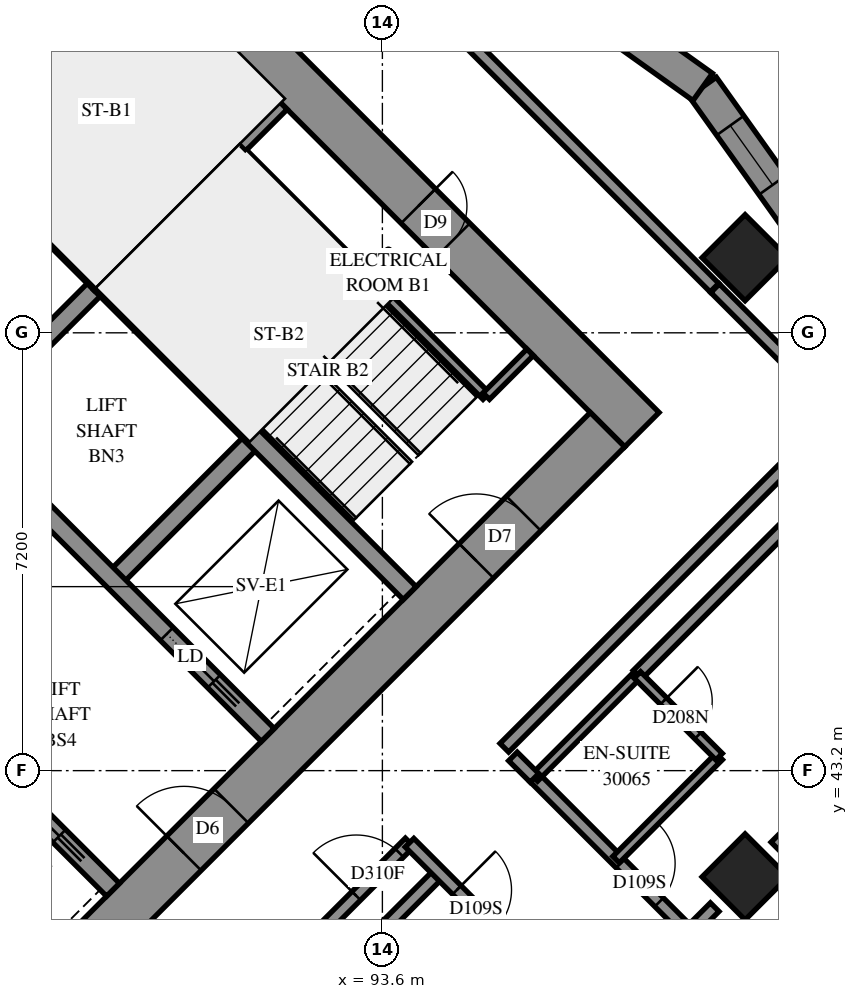
"""IFC4 building model, lengths in metres.
Left out: names, types, materials, properties, quantities, classifications, styles, units other than length and angle.
Written with IfcOpenShell. Run it as: python <this file> out.ifc"""

import sys

from ifc_helpers import new_model, si_unit, direction, frame, frame_2d, origin, origin_2d, place, context, subcontext, project, spatial, polyline, rectangle, outline, extrude, element, fill, save


model = new_model("IFC4")
c1 = context("Model", 3, precision=1e-05, world=origin(), true_north=direction((0.0, 1.0)))
c2 = subcontext(c1, "Body", "Model", "MODEL_VIEW")
j1 = project(units=[si_unit("LENGTHUNIT", "METRE"), si_unit("PLANEANGLEUNIT", "RADIAN")], contexts=[c1])
p1 = place(None, origin())
s1 = spatial("IfcSite", under=j1, at=p1, CompositionType="ELEMENT")
p2 = place(p1, origin())
s2 = spatial("IfcBuilding", under=s1, at=p2, CompositionType="ELEMENT")
p3 = place(p2, frame((0.0, 0.0, 111.8)))
s3 = spatial("IfcBuildingStorey", under=s2, at=p3, CompositionType="ELEMENT", Elevation=111.8)
for number, where, z_axis, x_axis in (
    (1, (99.565, 51.635, 0.0), (0.0, 0.0, 1.0), (0.707, -0.707, 0.0)),
    (2, (99.565, 41.453, 0.0), (0.0, 0.0, 1.0), (0.707, -0.707, 0.0)),
):
    element("IfcColumn", number, at=place(p3, frame(where, z_axis=z_axis, x_axis=x_axis)), inside=s3, PredefinedType="COLUMN", context=c2, shape_type="SweptSolid", body=[
        extrude(rectangle(XDim=1.0, YDim=1.0, at=origin_2d()), origin(), (0.0, 0.0, 1.0), 3.1),
    ])
p4 = place(p3, frame((86.554, 60.121, -0.3), z_axis=(0.0, 0.0, 1.0), x_axis=(0.7071067812, -0.7071067812, 0.0)))
e3 = element("IfcWall", 3, at=p4, inside=s3, PredefinedType="SHEAR", context=c2, shape_type="SweptSolid", body=[
    extrude(rectangle(XDim=16.0, YDim=0.8, at=frame_2d((8.0, 0.0))), origin(), (0.0, 0.0, 1.0), 2.7),
])
p5 = place(p4, frame((10.8, 0.0, 0.3)))
e4 = element("IfcOpeningElement", 4, at=p5, cuts=e3, PredefinedType="OPENING", context=c2, shape_type="SweptSolid", body=[
    extrude(rectangle(XDim=0.8, YDim=2.1, at=frame_2d((0.4, 1.05))), frame((0.0, 0.41, 0.0), z_axis=(0.0, -1.0, 0.0), x_axis=(1.0, 0.0, 0.0)), (0.0, 0.0, 1.0), 0.82),
])
p6 = place(p3, frame((87.12, 38.625, -0.3), z_axis=(0.0, 0.0, 1.0), x_axis=(0.7071067812, 0.7071067812, 0.0)))
e5 = element("IfcWall", 5, at=p6, inside=s3, PredefinedType="SHEAR", context=c2, shape_type="SweptSolid", body=[
    extrude(rectangle(XDim=14.4, YDim=0.8, at=frame_2d((7.2, 0.0))), origin(), (0.0, 0.0, 1.0), 2.7),
])
p7 = place(p6, frame((4.55, 0.0, 0.3)))
e6 = element("IfcOpeningElement", 6, at=p7, cuts=e5, PredefinedType="OPENING", context=c2, shape_type="SweptSolid", body=[
    extrude(rectangle(XDim=1.1, YDim=2.1, at=frame_2d((0.55, 1.05))), frame((0.0, 0.41, 0.0), z_axis=(0.0, -1.0, 0.0), x_axis=(1.0, 0.0, 0.0)), (0.0, 0.0, 1.0), 0.82),
])
p8 = place(p6, frame((11.35, 0.0, 0.3)))
e7 = element("IfcOpeningElement", 7, at=p8, cuts=e5, PredefinedType="OPENING", context=c2, shape_type="SweptSolid", body=[
    extrude(rectangle(XDim=1.1, YDim=2.1, at=frame_2d((0.55, 1.05))), frame((0.0, 0.41, 0.0), z_axis=(0.0, -1.0, 0.0), x_axis=(1.0, 0.0, 0.0)), (0.0, 0.0, 1.0), 0.82),
])
for number, where, z_axis, x_axis in (
    (8, (86.625, 48.878, 0.0), (0.0, 0.0, 1.0), (0.707, 0.707, 0.0)),
    (9, (89.17, 46.332, 0.0), (0.0, 0.0, 1.0), (0.707, 0.707, 0.0)),
):
    element("IfcWall", number, at=place(p3, frame(where, z_axis=z_axis, x_axis=x_axis)), inside=s3, PredefinedType="SOLIDWALL", context=c2, shape_type="SweptSolid", body=[
        extrude(rectangle(XDim=3.3, YDim=0.3, at=frame_2d((1.65, 0.0))), origin(), (0.0, 0.0, 1.0), 3.1),
    ])
p9 = place(p3, frame((78.988, 51.423, 0.0), z_axis=(0.0, 0.0, 1.0), x_axis=(0.7071067812, -0.7071067812, 0.0)))
e10 = element("IfcWall", 10, at=p9, inside=s3, PredefinedType="SOLIDWALL", context=c2, shape_type="SweptSolid", body=[
    extrude(rectangle(XDim=14.4, YDim=0.3, at=frame_2d((7.2, 0.0))), origin(), (0.0, 0.0, 1.0), 3.1),
])
p10 = place(p9, frame((1.25, 0.0, 0.0)))
e11 = element("IfcOpeningElement", 11, at=p10, cuts=e10, PredefinedType="OPENING", context=c2, shape_type="SweptSolid", body=[
    extrude(rectangle(XDim=1.1, YDim=2.1, at=frame_2d((0.55, 1.05))), frame((0.0, 0.16, 0.0), z_axis=(0.0, -1.0, 0.0), x_axis=(1.0, 0.0, 0.0)), (0.0, 0.0, 1.0), 0.32),
])
p11 = place(p9, frame((4.85, 0.0, 0.0)))
e12 = element("IfcOpeningElement", 12, at=p11, cuts=e10, PredefinedType="OPENING", context=c2, shape_type="SweptSolid", body=[
    extrude(rectangle(XDim=1.1, YDim=2.1, at=frame_2d((0.55, 1.05))), frame((0.0, 0.16, 0.0), z_axis=(0.0, -1.0, 0.0), x_axis=(1.0, 0.0, 0.0)), (0.0, 0.0, 1.0), 0.32),
])
p12 = place(p9, frame((8.45, 0.0, 0.0)))
e13 = element("IfcOpeningElement", 13, at=p12, cuts=e10, PredefinedType="OPENING", context=c2, shape_type="SweptSolid", body=[
    extrude(rectangle(XDim=1.1, YDim=2.1, at=frame_2d((0.55, 1.05))), frame((0.0, 0.16, 0.0), z_axis=(0.0, -1.0, 0.0), x_axis=(1.0, 0.0, 0.0)), (0.0, 0.0, 1.0), 0.32),
])
p13 = place(p9, frame((12.05, 0.0, 0.0)))
e14 = element("IfcOpeningElement", 14, at=p13, cuts=e10, PredefinedType="OPENING", context=c2, shape_type="SweptSolid", body=[
    extrude(rectangle(XDim=1.1, YDim=2.1, at=frame_2d((0.55, 1.05))), frame((0.0, 0.16, 0.0), z_axis=(0.0, -1.0, 0.0), x_axis=(1.0, 0.0, 0.0)), (0.0, 0.0, 1.0), 0.32),
])
p14 = place(p3, frame((81.534, 53.969, 0.0), z_axis=(0.0, 0.0, 1.0), x_axis=(0.707103309, -0.7071102534, 0.0)))
e15 = element("IfcWall", 15, at=p14, inside=s3, PredefinedType="SOLIDWALL", context=c2, shape_type="SweptSolid", body=[
    extrude(rectangle(XDim=14.4, YDim=0.3, at=frame_2d((7.2, 0.0))), origin(), (0.0, 0.0, 1.0), 3.1),
])
p15 = place(p14, frame((12.05, 0.0, 0.0)))
e16 = element("IfcOpeningElement", 16, at=p15, cuts=e15, PredefinedType="OPENING", context=c2, shape_type="SweptSolid", body=[
    extrude(rectangle(XDim=1.1, YDim=2.1, at=frame_2d((0.55, 1.05))), frame((0.0, 0.16, 0.0), z_axis=(0.0, -1.0, 0.0), x_axis=(1.0, 0.0, 0.0)), (0.0, 0.0, 1.0), 0.32),
])
for number, where, z_axis, x_axis in (
    (17, (83.867, 56.302, 0.0), (0.0, 0.0, 1.0), (0.707, -0.707, 0.0)),
    (18, (88.958, 51.211, 0.0), (0.0, 0.0, 1.0), (0.707, -0.707, 0.0)),
):
    element("IfcWall", number, at=place(p3, frame(where, z_axis=z_axis, x_axis=x_axis)), inside=s3, PredefinedType="SOLIDWALL", context=c2, shape_type="SweptSolid", body=[
        extrude(rectangle(XDim=7.2, YDim=0.3, at=frame_2d((3.6, 0.0))), origin(), (0.0, 0.0, 1.0), 3.1),
    ])
p16 = place(p3, frame((88.958, 51.211, 0.0), z_axis=(0.0, 0.0, 1.0), x_axis=(0.7071067812, 0.7071067812, 0.0)))
e19 = element("IfcWall", 19, at=p16, inside=s3, PredefinedType="SOLIDWALL", context=c2, shape_type="SweptSolid", body=[
    extrude(rectangle(XDim=4.2, YDim=0.3, at=frame_2d((2.1, 0.0))), origin(), (0.0, 0.0, 1.0), 3.1),
])
p17 = place(p3, frame((100.877, 51.626, 0.0), z_axis=(0.0, 0.0, 1.0), x_axis=(-0.5805272785, 0.8142407991, 0.0)))
e20 = element("IfcWall", 20, at=p17, inside=s3, PredefinedType="SOLIDWALL", context=c2, shape_type="SweptSolid", body=[
    extrude(outline(polyline([(0.046, -0.275), (3.507, -0.275), (3.414, 0.275), (-0.046, 0.275), (0.046, -0.275)])), origin(), (0.0, 0.0, 1.0), 3.1),
])
p18 = place(p17, frame((1.481, 0.0, 0.5)))
e21 = element("IfcOpeningElement", 21, at=p18, cuts=e20, PredefinedType="OPENING", context=c2, shape_type="SweptSolid", body=[
    extrude(rectangle(XDim=1.2, YDim=2.45, at=frame_2d((0.6, 1.225))), frame((0.0, 0.285, 0.0), z_axis=(0.0, -1.0, 0.0), x_axis=(1.0, 0.0, 0.0)), (0.0, 0.0, 1.0), 0.57),
])
p19 = place(p3, frame((98.868, 54.444, 0.0), z_axis=(0.0, 0.0, 1.0), x_axis=(-0.8142544581, 0.5805081201, 0.0)))
e22 = element("IfcWall", 22, at=p19, inside=s3, PredefinedType="SOLIDWALL", context=c2, shape_type="SweptSolid", body=[
    extrude(outline(polyline([(-0.046, -0.275), (3.414, -0.275), (3.507, 0.275), (0.046, 0.275), (-0.046, -0.275)])), origin(), (0.0, 0.0, 1.0), 3.1),
])
p20 = place(p19, frame((1.599, 0.0, 0.5)))
e23 = element("IfcOpeningElement", 23, at=p20, cuts=e22, PredefinedType="OPENING", context=c2, shape_type="SweptSolid", body=[
    extrude(rectangle(XDim=1.2, YDim=2.45, at=frame_2d((0.6, 1.225))), frame((0.0, 0.285, 0.0), z_axis=(0.0, -1.0, 0.0), x_axis=(1.0, 0.0, 0.0)), (0.0, 0.0, 1.0), 0.57),
])
p21 = place(p3, frame((91.313, 53.354, 0.0), z_axis=(0.0, 0.0, 1.0), x_axis=(0.7071067812, -0.7071067812, 0.0)))
e24 = element("IfcWall", 24, at=p21, inside=s3, PredefinedType="PARTITIONING", context=c2, shape_type="SweptSolid", body=[
    extrude(rectangle(XDim=5.65, YDim=0.15, at=frame_2d((2.825, 0.0))), origin(), (0.0, 0.0, 1.0), 3.1),
])
p22 = place(p3, frame((95.308, 49.358, 0.0), z_axis=(0.0, 0.0, 1.0), x_axis=(0.70705776, 0.707155799, 0.0)))
e25 = element("IfcWall", 25, at=p22, inside=s3, PredefinedType="PARTITIONING", context=c2, shape_type="SweptSolid", body=[
    extrude(rectangle(XDim=1.02, YDim=0.15, at=frame_2d((0.51, 0.0))), origin(), (0.0, 0.0, 1.0), 3.1),
])
p23 = place(p3, frame((86.331, 33.312, 0.0), z_axis=(0.0, 0.0, 1.0), x_axis=(0.707102476, 0.7071110864, 0.0)))
e26 = element("IfcWall", 26, at=p23, inside=s3, PredefinedType="PARTITIONING", context=c2, shape_type="SweptSolid", body=[
    extrude(rectangle(XDim=11.614, YDim=0.2, at=frame_2d((5.807, 0.0))), origin(), (0.0, 0.0, 1.0), 3.1),
])
p24 = place(p3, frame((86.835, 34.806, 0.0), z_axis=(0.0, 0.0, 1.0), x_axis=(0.7071067812, 0.7071067812, 0.0)))
e27 = element("IfcWall", 27, at=p24, inside=s3, PredefinedType="PARTITIONING", context=c2, shape_type="SweptSolid", body=[
    extrude(rectangle(XDim=10.201, YDim=0.2, at=frame_2d((5.1, 0.0))), origin(), (0.0, 0.0, 1.0), 3.1),
])
p25 = place(p24, frame((8.959, 0.0, 0.0)))
e28 = element("IfcOpeningElement", 28, at=p25, cuts=e27, PredefinedType="OPENING", context=c2, shape_type="SweptSolid", body=[
    extrude(rectangle(XDim=1.0, YDim=2.1, at=frame_2d((0.5, 1.05))), frame((0.0, 0.11, 0.0), z_axis=(0.0, -1.0, 0.0), x_axis=(1.0, 0.0, 0.0)), (0.0, 0.0, 1.0), 0.22),
])
p26 = place(p3, frame((94.047, 42.015, 0.0), z_axis=(0.0, 0.0, 1.0), x_axis=(0.7071067812, -0.7071067812, 0.0)))
e29 = element("IfcWall", 29, at=p26, inside=s3, PredefinedType="PARTITIONING", context=c2, shape_type="SweptSolid", body=[
    extrude(rectangle(XDim=9.6, YDim=0.2, at=frame_2d((4.8, 0.0))), origin(), (0.0, 0.0, 1.0), 3.1),
])
p27 = place(p26, frame((1.099, 0.0, 0.0)))
e30 = element("IfcOpeningElement", 30, at=p27, cuts=e29, PredefinedType="OPENING", context=c2, shape_type="SweptSolid", body=[
    extrude(rectangle(XDim=0.9, YDim=2.1, at=frame_2d((0.45, 1.05))), frame((0.0, 0.11, 0.0), z_axis=(0.0, -1.0, 0.0), x_axis=(1.0, 0.0, 0.0)), (0.0, 0.0, 1.0), 0.22),
])
p28 = place(p26, frame((6.649, 0.0, 0.0)))
e31 = element("IfcOpeningElement", 31, at=p28, cuts=e29, PredefinedType="OPENING", context=c2, shape_type="SweptSolid", body=[
    extrude(rectangle(XDim=0.9, YDim=2.1, at=frame_2d((0.45, 1.05))), frame((0.0, 0.11, 0.0), z_axis=(0.0, -1.0, 0.0), x_axis=(1.0, 0.0, 0.0)), (0.0, 0.0, 1.0), 0.22),
])
p29 = place(p26, frame((8.3, 0.0, 0.0)))
e32 = element("IfcOpeningElement", 32, at=p29, cuts=e29, PredefinedType="OPENING", context=c2, shape_type="SweptSolid", body=[
    extrude(rectangle(XDim=0.9, YDim=2.1, at=frame_2d((0.45, 1.05))), frame((0.0, 0.11, 0.0), z_axis=(0.0, -1.0, 0.0), x_axis=(1.0, 0.0, 0.0)), (0.0, 0.0, 1.0), 0.22),
])
p30 = place(p3, frame((96.103, 43.083, 0.0), z_axis=(0.0, 0.0, 1.0), x_axis=(0.7071067812, -0.7071067812, 0.0)))
e33 = element("IfcWall", 33, at=p30, inside=s3, PredefinedType="PARTITIONING", context=c2, shape_type="SweptSolid", body=[
    extrude(rectangle(XDim=8.491, YDim=0.2, at=frame_2d((4.245, 0.0))), origin(), (0.0, 0.0, 1.0), 3.1),
])
p31 = place(p30, frame((1.995, 0.0, 0.0)))
e34 = element("IfcOpeningElement", 34, at=p31, cuts=e33, PredefinedType="OPENING", context=c2, shape_type="SweptSolid", body=[
    extrude(rectangle(XDim=0.9, YDim=2.1, at=frame_2d((0.45, 1.05))), frame((0.0, 0.11, 0.0), z_axis=(0.0, -1.0, 0.0), x_axis=(1.0, 0.0, 0.0)), (0.0, 0.0, 1.0), 0.22),
])
p32 = place(p30, frame((4.27, 0.0, 0.0)))
e35 = element("IfcOpeningElement", 35, at=p32, cuts=e33, PredefinedType="OPENING", context=c2, shape_type="SweptSolid", body=[
    extrude(rectangle(XDim=0.9, YDim=2.1, at=frame_2d((0.45, 1.05))), frame((0.0, 0.11, 0.0), z_axis=(0.0, -1.0, 0.0), x_axis=(1.0, 0.0, 0.0)), (0.0, 0.0, 1.0), 0.22),
])
p33 = place(p3, frame((95.606, 43.577, 0.0), z_axis=(0.0, 0.0, 1.0), x_axis=(0.7071067812, 0.7071067812, 0.0)))
e36 = element("IfcWall", 36, at=p33, inside=s3, PredefinedType="PARTITIONING", context=c2, shape_type="SweptSolid", body=[
    extrude(rectangle(XDim=7.798, YDim=0.2, at=frame_2d((3.899, 0.0))), origin(), (0.0, 0.0, 1.0), 3.1),
])
p34 = place(p3, frame((93.981, 56.223, 0.0), z_axis=(0.0, 0.0, 1.0), x_axis=(0.7071067812, -0.7071067812, 0.0)))
e37 = element("IfcWall", 37, at=p34, inside=s3, PredefinedType="PARTITIONING", context=c2, shape_type="SweptSolid", body=[
    extrude(rectangle(XDim=7.184, YDim=0.2, at=frame_2d((3.592, 0.0))), origin(), (0.0, 0.0, 1.0), 3.1),
])
p35 = place(p3, frame((97.795, 44.777, 0.0), z_axis=(0.0, 0.0, 1.0), x_axis=(0.7071137356, 0.7070998267, 0.0)))
e38 = element("IfcWall", 38, at=p35, inside=s3, PredefinedType="PARTITIONING", context=c2, shape_type="SweptSolid", body=[
    extrude(rectangle(XDim=7.19, YDim=0.2, at=frame_2d((3.595, 0.0))), origin(), (0.0, 0.0, 1.0), 3.1),
])
p36 = place(p3, frame((100.063, 41.953, 0.0), z_axis=(0.0, 0.0, 1.0), x_axis=(0.7071067812, 0.7071067812, 0.0)))
e39 = element("IfcWall", 39, at=p36, inside=s3, PredefinedType="PARTITIONING", context=c2, shape_type="SweptSolid", body=[
    extrude(rectangle(XDim=5.787, YDim=0.2, at=frame_2d((2.893, 0.0))), origin(), (0.0, 0.0, 1.0), 3.1),
])
p37 = place(p3, frame((99.071, 51.133, 0.0), z_axis=(0.0, 0.0, 1.0), x_axis=(0.7071067812, -0.7071067812, 0.0)))
e40 = element("IfcWall", 40, at=p37, inside=s3, PredefinedType="PARTITIONING", context=c2, shape_type="SweptSolid", body=[
    extrude(rectangle(XDim=2.893, YDim=0.2, at=frame_2d((1.447, 0.0))), origin(), (0.0, 0.0, 1.0), 3.1),
])
for number, where, z_axis, x_axis in (
    (41, (97.443, 41.737, 0.0), (0.0, 0.0, 1.0), (0.707, 0.707, 0.0)),
    (42, (96.099, 43.081, 0.0), (0.0, 0.0, 1.0), (0.707, 0.707, 0.0)),
    (43, (99.847, 39.333, 0.0), (0.0, 0.0, 1.0), (0.707, 0.707, 0.0)),
):
    element("IfcWall", number, at=place(p3, frame(where, z_axis=z_axis, x_axis=x_axis)), inside=s3, PredefinedType="PARTITIONING", context=c2, shape_type="SweptSolid", body=[
        extrude(rectangle(XDim=2.398, YDim=0.15, at=frame_2d((1.199, 0.0))), origin(), (0.0, 0.0, 1.0), 3.1),
    ])
p38 = place(p3, frame((97.793, 44.773, 0.0), z_axis=(0.0, 0.0, 1.0), x_axis=(0.7071067812, -0.7071067812, 0.0)))
e44 = element("IfcWall", 44, at=p38, inside=s3, PredefinedType="PARTITIONING", context=c2, shape_type="SweptSolid", body=[
    extrude(rectangle(XDim=1.901, YDim=0.15, at=frame_2d((0.95, 0.0))), origin(), (0.0, 0.0, 1.0), 3.1),
])
p39 = place(p38, frame((0.609, 0.0, 0.0)))
e45 = element("IfcOpeningElement", 45, at=p39, cuts=e44, PredefinedType="OPENING", context=c2, shape_type="SweptSolid", body=[
    extrude(rectangle(XDim=0.8, YDim=2.1, at=frame_2d((0.4, 1.05))), frame((0.0, 0.085, 0.0), z_axis=(0.0, -1.0, 0.0), x_axis=(1.0, 0.0, 0.0)), (0.0, 0.0, 1.0), 0.17),
])
p40 = place(p3, frame((98.645, 40.535, 0.0), z_axis=(0.0, 0.0, 1.0), x_axis=(0.7071067812, 0.7071067812, 0.0)))
e46 = element("IfcWall", 46, at=p40, inside=s3, PredefinedType="PARTITIONING", context=c2, shape_type="SweptSolid", body=[
    extrude(rectangle(XDim=0.594, YDim=0.2, at=frame_2d((0.297, 0.0))), origin(), (0.0, 0.0, 1.0), 3.1),
])
p41 = place(p3, frame((95.747, 43.433, 0.0), z_axis=(0.0, 0.0, 1.0), x_axis=(0.7091070712, -0.7051008166, 0.0)))
e47 = element("IfcWall", 47, at=p41, inside=s3, PredefinedType="PARTITIONING", context=c2, shape_type="SweptSolid", body=[
    extrude(rectangle(XDim=0.499, YDim=0.2, at=frame_2d((0.25, 0.0))), origin(), (0.0, 0.0, 1.0), 3.1),
])
p42 = place(p18, origin())
e48 = element("IfcWindow", 48, at=p42, inside=s3, PartitioningType="SINGLE_PANEL", PredefinedType="WINDOW", context=c2, shape_type="SweptSolid", body=[
    extrude(rectangle(XDim=1.2, YDim=2.45, at=frame_2d((0.6, 1.225))), frame((0.0, 0.155, 0.0), z_axis=(0.0, -1.0, 0.0), x_axis=(1.0, 0.0, 0.0)), (0.0, 0.0, 1.0), 0.06),
])
fill(e21, e48)
p43 = place(p5, origin())
e49 = element("IfcDoor", 49, at=p43, inside=s3, OperationType="SINGLE_SWING_RIGHT", PredefinedType="DOOR", context=c2, shape_type="SweptSolid", body=[
    extrude(rectangle(XDim=0.8, YDim=2.1, at=frame_2d((0.4, 1.05))), frame((0.0, -0.34, 0.0), z_axis=(0.0, -1.0, 0.0), x_axis=(1.0, 0.0, 0.0)), (0.0, 0.0, 1.0), 0.05),
])
fill(e4, e49)
p44 = place(p7, origin())
e50 = element("IfcDoor", 50, at=p44, inside=s3, OperationType="DOUBLE_DOOR_SINGLE_SWING", PredefinedType="DOOR", context=c2, shape_type="SweptSolid", body=[
    extrude(rectangle(XDim=1.1, YDim=2.1, at=frame_2d((0.55, 1.05))), frame((0.0, 0.025, 0.0), z_axis=(0.0, -1.0, 0.0), x_axis=(1.0, 0.0, 0.0)), (0.0, 0.0, 1.0), 0.05),
])
fill(e6, e50)
p45 = place(p8, origin())
e51 = element("IfcDoor", 51, at=p45, inside=s3, OperationType="SINGLE_SWING_RIGHT", PredefinedType="DOOR", context=c2, shape_type="SweptSolid", body=[
    extrude(rectangle(XDim=1.1, YDim=2.1, at=frame_2d((0.55, 1.05))), frame((0.0, 0.025, 0.0), z_axis=(0.0, -1.0, 0.0), x_axis=(1.0, 0.0, 0.0)), (0.0, 0.0, 1.0), 0.05),
])
fill(e7, e51)
p46 = place(p13, origin())
e52 = element("IfcDoor", 52, at=p46, inside=s3, OperationType="SLIDING_TO_RIGHT", PredefinedType="DOOR", context=c2, shape_type="SweptSolid", body=[
    extrude(rectangle(XDim=1.1, YDim=2.1, at=frame_2d((0.55, 1.05))), frame((0.0, 0.025, 0.0), z_axis=(0.0, -1.0, 0.0), x_axis=(1.0, 0.0, 0.0)), (0.0, 0.0, 1.0), 0.05),
])
fill(e14, e52)
p47 = place(p15, origin())
e53 = element("IfcDoor", 53, at=p47, inside=s3, OperationType="SLIDING_TO_RIGHT", PredefinedType="DOOR", context=c2, shape_type="SweptSolid", body=[
    extrude(rectangle(XDim=1.1, YDim=2.1, at=frame_2d((0.55, 1.05))), frame((0.0, 0.025, 0.0), z_axis=(0.0, -1.0, 0.0), x_axis=(1.0, 0.0, 0.0)), (0.0, 0.0, 1.0), 0.05),
])
fill(e16, e53)
p48 = place(p31, origin())
e54 = element("IfcDoor", 54, at=p48, inside=s3, OperationType="SINGLE_SWING_RIGHT", PredefinedType="DOOR", context=c2, shape_type="SweptSolid", body=[
    extrude(rectangle(XDim=0.9, YDim=2.1, at=frame_2d((0.45, 1.05))), frame((0.0, 0.025, 0.0), z_axis=(0.0, -1.0, 0.0), x_axis=(1.0, 0.0, 0.0)), (0.0, 0.0, 1.0), 0.05),
])
fill(e34, e54)
p49 = place(p39, origin())
e55 = element("IfcDoor", 55, at=p49, inside=s3, OperationType="SINGLE_SWING_RIGHT", PredefinedType="DOOR", context=c2, shape_type="SweptSolid", body=[
    extrude(rectangle(XDim=0.8, YDim=2.1, at=frame_2d((0.4, 1.05))), frame((0.0, 0.025, 0.0), z_axis=(0.0, -1.0, 0.0), x_axis=(1.0, 0.0, 0.0)), (0.0, 0.0, 1.0), 0.05),
])
fill(e45, e55)
p50 = place(p25, origin())
e56 = element("IfcDoor", 56, at=p50, inside=s3, OperationType="SINGLE_SWING_LEFT", PredefinedType="DOOR", context=c2, shape_type="SweptSolid", body=[
    extrude(rectangle(XDim=1.0, YDim=2.1, at=frame_2d((0.5, 1.05))), frame((0.0, 0.025, 0.0), z_axis=(0.0, -1.0, 0.0), x_axis=(1.0, 0.0, 0.0)), (0.0, 0.0, 1.0), 0.05),
])
fill(e28, e56)
p51 = place(p27, origin())
e57 = element("IfcDoor", 57, at=p51, inside=s3, OperationType="SINGLE_SWING_LEFT", PredefinedType="DOOR", context=c2, shape_type="SweptSolid", body=[
    extrude(rectangle(XDim=0.9, YDim=2.1, at=frame_2d((0.45, 1.05))), frame((0.0, 0.025, 0.0), z_axis=(0.0, -1.0, 0.0), x_axis=(1.0, 0.0, 0.0)), (0.0, 0.0, 1.0), 0.05),
])
fill(e30, e57)
save(model, sys.argv[1])
